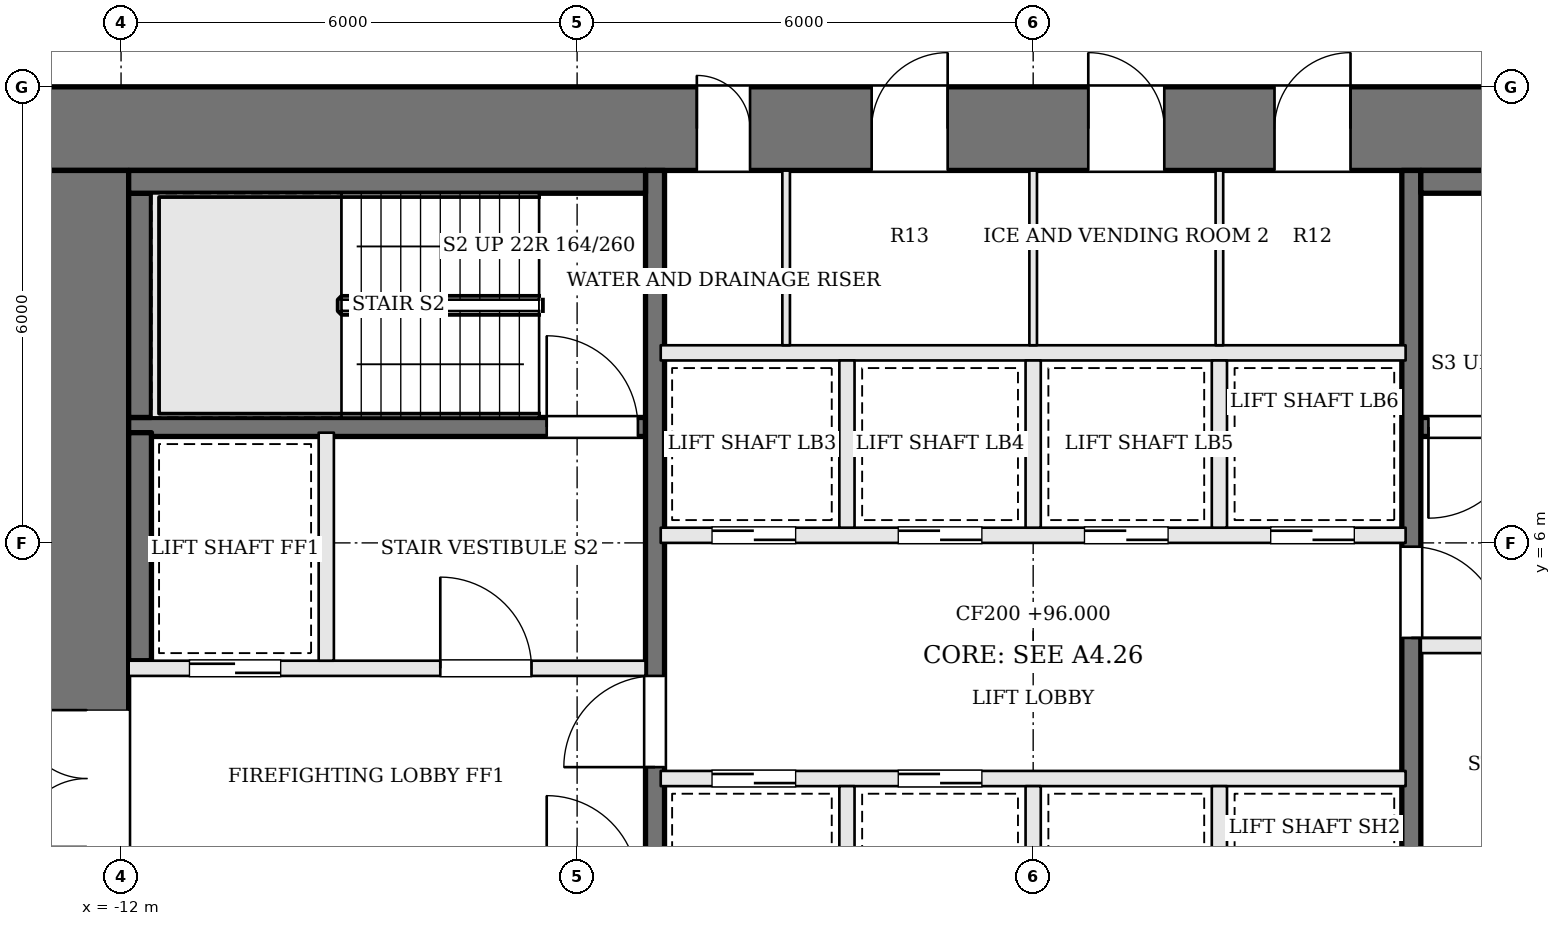
"""IFC4 building model, lengths in metres.
Left out: names, types, materials, properties, quantities, classifications, styles, units other than length and angle.
Written with IfcOpenShell. Run it as: python <this file> out.ifc"""

import sys

from ifc_helpers import new_model, si_unit, direction, frame, frame_2d, origin, place, context, subcontext, project, spatial, rectangle, extrude, element, fill, save


model = new_model("IFC4")
c1 = context("Model", 3, precision=1e-05, world=origin(), true_north=direction((0.0, 1.0)))
c2 = subcontext(c1, "Body", "Model", "MODEL_VIEW")
j1 = project(units=[si_unit("LENGTHUNIT", "METRE"), si_unit("PLANEANGLEUNIT", "RADIAN")], contexts=[c1])
p1 = place(None, origin())
s1 = spatial("IfcSite", under=j1, at=p1, CompositionType="ELEMENT")
p2 = place(p1, origin())
s2 = spatial("IfcBuilding", under=s1, at=p2, CompositionType="ELEMENT")
p3 = place(p2, frame((0.0, 0.0, 96.0)))
s3 = spatial("IfcBuildingStorey", under=s2, at=p3, CompositionType="ELEMENT", Elevation=96.0)
p4 = place(p3, frame((-13.0, 11.45, 0.0), z_axis=(0.0, 0.0, 1.0), x_axis=(1.0, 0.0, 0.0)))
e1 = element("IfcWall", 1, at=p4, inside=s3, PredefinedType="SHEAR", context=c2, shape_type="SweptSolid", body=[
    extrude(rectangle(XDim=26.0, YDim=1.1, at=frame_2d((13.0, 0.0))), origin(), (0.0, 0.0, 1.0), 3.6),
])
p5 = place(p4, frame((8.575, 0.0, 0.0)))
e2 = element("IfcOpeningElement", 2, at=p5, cuts=e1, PredefinedType="OPENING", context=c2, shape_type="SweptSolid", body=[
    extrude(rectangle(XDim=0.7, YDim=2.1, at=frame_2d((0.35, 1.05))), frame((0.0, 0.56, 0.0), z_axis=(0.0, -1.0, 0.0), x_axis=(1.0, 0.0, 0.0)), (0.0, 0.0, 1.0), 1.12),
])
p6 = place(p4, frame((10.875, 0.0, 0.0)))
e3 = element("IfcOpeningElement", 3, at=p6, cuts=e1, PredefinedType="OPENING", context=c2, shape_type="SweptSolid", body=[
    extrude(rectangle(XDim=1.0, YDim=2.1, at=frame_2d((0.5, 1.05))), frame((0.0, 0.56, 0.0), z_axis=(0.0, -1.0, 0.0), x_axis=(1.0, 0.0, 0.0)), (0.0, 0.0, 1.0), 1.12),
])
p7 = place(p4, frame((13.725, 0.0, 0.0)))
e4 = element("IfcOpeningElement", 4, at=p7, cuts=e1, PredefinedType="OPENING", context=c2, shape_type="SweptSolid", body=[
    extrude(rectangle(XDim=1.0, YDim=2.1, at=frame_2d((0.5, 1.05))), frame((0.0, 0.56, 0.0), z_axis=(0.0, -1.0, 0.0), x_axis=(1.0, 0.0, 0.0)), (0.0, 0.0, 1.0), 1.12),
])
p8 = place(p4, frame((16.175, 0.0, 0.0)))
e5 = element("IfcOpeningElement", 5, at=p8, cuts=e1, PredefinedType="OPENING", context=c2, shape_type="SweptSolid", body=[
    extrude(rectangle(XDim=1.0, YDim=2.1, at=frame_2d((0.5, 1.05))), frame((0.0, 0.56, 0.0), z_axis=(0.0, -1.0, 0.0), x_axis=(1.0, 0.0, 0.0)), (0.0, 0.0, 1.0), 1.12),
])
p9 = place(p3, frame((-12.45, -1.9, 0.0), z_axis=(0.0, 0.0, 1.0), x_axis=(0.0, 1.0, 0.0)))
e6 = element("IfcWall", 6, at=p9, inside=s3, PredefinedType="SHEAR", context=c2, shape_type="SweptSolid", body=[
    extrude(rectangle(XDim=12.8, YDim=1.1, at=frame_2d((6.4, 0.0))), origin(), (0.0, 0.0, 1.0), 3.6),
])
p10 = place(p9, frame((3.9, 0.0, 0.0)))
e7 = element("IfcOpeningElement", 7, at=p10, cuts=e6, PredefinedType="OPENING", context=c2, shape_type="SweptSolid", body=[
    extrude(rectangle(XDim=1.8, YDim=2.1, at=frame_2d((0.9, 1.05))), frame((0.0, 0.56, 0.0), z_axis=(0.0, -1.0, 0.0), x_axis=(1.0, 0.0, 0.0)), (0.0, 0.0, 1.0), 1.12),
])
p11 = place(p3, frame((11.9, 7.525, 0.0), z_axis=(0.0, 0.0, 1.0), x_axis=(-1.0, 0.0, 0.0)))
e8 = element("IfcWall", 8, at=p11, inside=s3, PredefinedType="SOLIDWALL", context=c2, shape_type="SweptSolid", body=[
    extrude(rectangle(XDim=6.8, YDim=0.25, at=frame_2d((3.4, 0.0))), origin(), (0.0, 0.0, 1.0), 3.4),
])
p12 = place(p11, frame((5.5, 0.0, 0.0)))
e9 = element("IfcOpeningElement", 9, at=p12, cuts=e8, PredefinedType="OPENING", context=c2, shape_type="SweptSolid", body=[
    extrude(rectangle(XDim=1.2, YDim=2.1, at=frame_2d((0.6, 1.05))), frame((0.0, 0.135, 0.0), z_axis=(0.0, -1.0, 0.0), x_axis=(1.0, 0.0, 0.0)), (0.0, 0.0, 1.0), 0.27),
])
p13 = place(p3, frame((-11.9, 4.35, 0.0), z_axis=(0.0, 0.0, 1.0), x_axis=(1.0, 0.0, 0.0)))
e10 = element("IfcWall", 10, at=p13, inside=s3, PredefinedType="SOLIDWALL", context=c2, shape_type="SweptSolid", body=[
    extrude(rectangle(XDim=6.8, YDim=0.2, at=frame_2d((3.4, 0.0))), origin(), (0.0, 0.0, 1.0), 3.4),
])
p14 = place(p13, frame((4.1, 0.0, 0.0)))
e11 = element("IfcOpeningElement", 11, at=p14, cuts=e10, PredefinedType="OPENING", context=c2, shape_type="SweptSolid", body=[
    extrude(rectangle(XDim=1.2, YDim=2.1, at=frame_2d((0.6, 1.05))), frame((0.0, 0.11, 0.0), z_axis=(0.0, -1.0, 0.0), x_axis=(1.0, 0.0, 0.0)), (0.0, 0.0, 1.0), 0.22),
])
p15 = place(p13, frame((0.8, 0.0, 0.0)))
e12 = element("IfcOpeningElement", 12, at=p15, cuts=e10, PredefinedType="OPENING", context=c2, shape_type="SweptSolid", body=[
    extrude(rectangle(XDim=1.2, YDim=2.1, at=frame_2d((0.6, 1.05))), frame((0.0, 0.11, 0.0), z_axis=(0.0, -1.0, 0.0), x_axis=(1.0, 0.0, 0.0)), (0.0, 0.0, 1.0), 0.22),
])
p16 = place(p3, frame((11.9, 4.65, 0.0), z_axis=(0.0, 0.0, 1.0), x_axis=(-1.0, 0.0, 0.0)))
e13 = element("IfcWall", 13, at=p16, inside=s3, PredefinedType="SOLIDWALL", context=c2, shape_type="SweptSolid", body=[
    extrude(rectangle(XDim=6.8, YDim=0.2, at=frame_2d((3.4, 0.0))), origin(), (0.0, 0.0, 1.0), 3.4),
])
p17 = place(p16, frame((4.1, 0.0, 0.0)))
e14 = element("IfcOpeningElement", 14, at=p17, cuts=e13, PredefinedType="OPENING", context=c2, shape_type="SweptSolid", body=[
    extrude(rectangle(XDim=1.2, YDim=2.1, at=frame_2d((0.6, 1.05))), frame((0.0, 0.11, 0.0), z_axis=(0.0, -1.0, 0.0), x_axis=(1.0, 0.0, 0.0)), (0.0, 0.0, 1.0), 0.22),
])
p18 = place(p16, frame((0.8, 0.0, 0.0)))
e15 = element("IfcOpeningElement", 15, at=p18, cuts=e13, PredefinedType="OPENING", context=c2, shape_type="SweptSolid", body=[
    extrude(rectangle(XDim=1.2, YDim=2.1, at=frame_2d((0.6, 1.05))), frame((0.0, 0.11, 0.0), z_axis=(0.0, -1.0, 0.0), x_axis=(1.0, 0.0, 0.0)), (0.0, 0.0, 1.0), 0.22),
])
p19 = place(p3, frame((-11.9, 7.525, 0.0), z_axis=(0.0, 0.0, 1.0), x_axis=(1.0, 0.0, 0.0)))
e16 = element("IfcWall", 16, at=p19, inside=s3, PredefinedType="SOLIDWALL", context=c2, shape_type="SweptSolid", body=[
    extrude(rectangle(XDim=6.8, YDim=0.25, at=frame_2d((3.4, 0.0))), origin(), (0.0, 0.0, 1.0), 3.4),
])
p20 = place(p19, frame((5.5, 0.0, 0.0)))
e17 = element("IfcOpeningElement", 17, at=p20, cuts=e16, PredefinedType="OPENING", context=c2, shape_type="SweptSolid", body=[
    extrude(rectangle(XDim=1.2, YDim=2.1, at=frame_2d((0.6, 1.05))), frame((0.0, 0.135, 0.0), z_axis=(0.0, -1.0, 0.0), x_axis=(1.0, 0.0, 0.0)), (0.0, 0.0, 1.0), 0.27),
])
p21 = place(p3, frame((-9.3, 4.45, 0.0), z_axis=(0.0, 0.0, 1.0), x_axis=(0.0, 1.0, 0.0)))
e18 = element("IfcWall", 18, at=p21, inside=s3, PredefinedType="SOLIDWALL", context=c2, shape_type="SweptSolid", body=[
    extrude(rectangle(XDim=3.0, YDim=0.2, at=frame_2d((1.5, 0.0))), origin(), (0.0, 0.0, 1.0), 3.4),
])
p22 = place(p3, frame((-4.975, -1.9, 0.0), z_axis=(0.0, 0.0, 1.0), x_axis=(0.0, 1.0, 0.0)))
e19 = element("IfcWall", 19, at=p22, inside=s3, PredefinedType="SOLIDWALL", context=c2, shape_type="SweptSolid", body=[
    extrude(rectangle(XDim=12.8, YDim=0.25, at=frame_2d((6.4, 0.0))), origin(), (0.0, 0.0, 1.0), 3.4),
])
p23 = place(p22, frame((4.95, 0.0, 0.0)))
e20 = element("IfcOpeningElement", 20, at=p23, cuts=e19, PredefinedType="OPENING", context=c2, shape_type="SweptSolid", body=[
    extrude(rectangle(XDim=1.2, YDim=2.1, at=frame_2d((0.6, 1.05))), frame((0.0, 0.135, 0.0), z_axis=(0.0, -1.0, 0.0), x_axis=(1.0, 0.0, 0.0)), (0.0, 0.0, 1.0), 0.27),
])
p24 = place(p3, frame((4.975, 10.9, 0.0), z_axis=(0.0, 0.0, 1.0), x_axis=(0.0, -1.0, 0.0)))
e21 = element("IfcWall", 21, at=p24, inside=s3, PredefinedType="SOLIDWALL", context=c2, shape_type="SweptSolid", body=[
    extrude(rectangle(XDim=12.8, YDim=0.25, at=frame_2d((6.4, 0.0))), origin(), (0.0, 0.0, 1.0), 3.4),
])
p25 = place(p24, frame((4.95, 0.0, 0.0)))
e22 = element("IfcOpeningElement", 22, at=p25, cuts=e21, PredefinedType="OPENING", context=c2, shape_type="SweptSolid", body=[
    extrude(rectangle(XDim=1.2, YDim=2.1, at=frame_2d((0.6, 1.05))), frame((0.0, 0.135, 0.0), z_axis=(0.0, -1.0, 0.0), x_axis=(1.0, 0.0, 0.0)), (0.0, 0.0, 1.0), 0.27),
])
p26 = place(p3, frame((-11.75, 4.45, 0.0), z_axis=(0.0, 0.0, 1.0), x_axis=(0.0, 1.0, 0.0)))
e23 = element("IfcWall", 23, at=p26, inside=s3, PredefinedType="SOLIDWALL", context=c2, shape_type="SweptSolid", body=[
    extrude(rectangle(XDim=3.0, YDim=0.3, at=frame_2d((1.5, 0.0))), origin(), (0.0, 0.0, 1.0), 3.4),
])
p27 = place(p3, frame((-11.75, 7.65, 0.0), z_axis=(0.0, 0.0, 1.0), x_axis=(0.0, 1.0, 0.0)))
e24 = element("IfcWall", 24, at=p27, inside=s3, PredefinedType="SOLIDWALL", context=c2, shape_type="SweptSolid", body=[
    extrude(rectangle(XDim=2.95, YDim=0.3, at=frame_2d((1.475, 0.0))), origin(), (0.0, 0.0, 1.0), 3.4),
])
for number, where, z_axis, x_axis in (
    (25, (-11.9, 10.75, 0.0), (0.0, 0.0, 1.0), (1.0, 0.0, 0.0)),
    (26, (11.9, 10.75, 0.0), (0.0, 0.0, 1.0), (-1.0, 0.0, 0.0)),
):
    element("IfcWall", number, at=place(p3, frame(where, z_axis=z_axis, x_axis=x_axis)), inside=s3, PredefinedType="SOLIDWALL", context=c2, shape_type="SweptSolid", body=[
        extrude(rectangle(XDim=6.8, YDim=0.3, at=frame_2d((3.4, 0.0))), origin(), (0.0, 0.0, 1.0), 3.4),
    ])
p28 = place(p3, frame((-4.9, 2.9, 0.0), z_axis=(0.0, 0.0, 1.0), x_axis=(1.0, 0.0, 0.0)))
e27 = element("IfcWall", 27, at=p28, inside=s3, PredefinedType="SOLIDWALL", context=c2, shape_type="SweptSolid", body=[
    extrude(rectangle(XDim=9.8, YDim=0.2, at=frame_2d((4.9, 0.0))), origin(), (0.0, 0.0, 1.0), 3.4),
])
p29 = place(p28, frame((0.675, 0.0, 0.0)))
e28 = element("IfcOpeningElement", 28, at=p29, cuts=e27, PredefinedType="OPENING", context=c2, shape_type="SweptSolid", body=[
    extrude(rectangle(XDim=1.1, YDim=2.1, at=frame_2d((0.55, 1.05))), frame((0.0, 0.11, 0.0), z_axis=(0.0, -1.0, 0.0), x_axis=(1.0, 0.0, 0.0)), (0.0, 0.0, 1.0), 0.22),
])
p30 = place(p28, frame((3.125, 0.0, 0.0)))
e29 = element("IfcOpeningElement", 29, at=p30, cuts=e27, PredefinedType="OPENING", context=c2, shape_type="SweptSolid", body=[
    extrude(rectangle(XDim=1.1, YDim=2.1, at=frame_2d((0.55, 1.05))), frame((0.0, 0.11, 0.0), z_axis=(0.0, -1.0, 0.0), x_axis=(1.0, 0.0, 0.0)), (0.0, 0.0, 1.0), 0.22),
])
p31 = place(p3, frame((-4.9, 6.1, 0.0), z_axis=(0.0, 0.0, 1.0), x_axis=(1.0, 0.0, 0.0)))
e30 = element("IfcWall", 30, at=p31, inside=s3, PredefinedType="SOLIDWALL", context=c2, shape_type="SweptSolid", body=[
    extrude(rectangle(XDim=9.8, YDim=0.2, at=frame_2d((4.9, 0.0))), origin(), (0.0, 0.0, 1.0), 3.4),
])
p32 = place(p31, frame((0.675, 0.0, 0.0)))
e31 = element("IfcOpeningElement", 31, at=p32, cuts=e30, PredefinedType="OPENING", context=c2, shape_type="SweptSolid", body=[
    extrude(rectangle(XDim=1.1, YDim=2.1, at=frame_2d((0.55, 1.05))), frame((0.0, 0.11, 0.0), z_axis=(0.0, -1.0, 0.0), x_axis=(1.0, 0.0, 0.0)), (0.0, 0.0, 1.0), 0.22),
])
p33 = place(p31, frame((3.125, 0.0, 0.0)))
e32 = element("IfcOpeningElement", 32, at=p33, cuts=e30, PredefinedType="OPENING", context=c2, shape_type="SweptSolid", body=[
    extrude(rectangle(XDim=1.1, YDim=2.1, at=frame_2d((0.55, 1.05))), frame((0.0, 0.11, 0.0), z_axis=(0.0, -1.0, 0.0), x_axis=(1.0, 0.0, 0.0)), (0.0, 0.0, 1.0), 0.22),
])
p34 = place(p31, frame((5.575, 0.0, 0.0)))
e33 = element("IfcOpeningElement", 33, at=p34, cuts=e30, PredefinedType="OPENING", context=c2, shape_type="SweptSolid", body=[
    extrude(rectangle(XDim=1.1, YDim=2.1, at=frame_2d((0.55, 1.05))), frame((0.0, 0.11, 0.0), z_axis=(0.0, -1.0, 0.0), x_axis=(1.0, 0.0, 0.0)), (0.0, 0.0, 1.0), 0.22),
])
p35 = place(p31, frame((8.025, 0.0, 0.0)))
e34 = element("IfcOpeningElement", 34, at=p35, cuts=e30, PredefinedType="OPENING", context=c2, shape_type="SweptSolid", body=[
    extrude(rectangle(XDim=1.1, YDim=2.1, at=frame_2d((0.55, 1.05))), frame((0.0, 0.11, 0.0), z_axis=(0.0, -1.0, 0.0), x_axis=(1.0, 0.0, 0.0)), (0.0, 0.0, 1.0), 0.22),
])
p36 = place(p3, frame((-4.9, 8.5, 0.0), z_axis=(0.0, 0.0, 1.0), x_axis=(1.0, 0.0, 0.0)))
e35 = element("IfcWall", 35, at=p36, inside=s3, PredefinedType="SOLIDWALL", context=c2, shape_type="SweptSolid", body=[
    extrude(rectangle(XDim=9.8, YDim=0.2, at=frame_2d((4.9, 0.0))), origin(), (0.0, 0.0, 1.0), 3.4),
])
for number, where, z_axis, x_axis in (
    (36, (-2.45, 0.6, 0.0), (0.0, 0.0, 1.0), (0.0, 1.0, 0.0)),
    (37, (0.0, 0.6, 0.0), (0.0, 0.0, 1.0), (0.0, 1.0, 0.0)),
    (38, (2.45, 0.6, 0.0), (0.0, 0.0, 1.0), (0.0, 1.0, 0.0)),
    (39, (-2.45, 6.2, 0.0), (0.0, 0.0, 1.0), (0.0, 1.0, 0.0)),
    (40, (0.0, 6.2, 0.0), (0.0, 0.0, 1.0), (0.0, 1.0, 0.0)),
    (41, (2.45, 6.2, 0.0), (0.0, 0.0, 1.0), (0.0, 1.0, 0.0)),
):
    element("IfcWall", number, at=place(p3, frame(where, z_axis=z_axis, x_axis=x_axis)), inside=s3, PredefinedType="SOLIDWALL", context=c2, shape_type="SweptSolid", body=[
        extrude(rectangle(XDim=2.2, YDim=0.2, at=frame_2d((1.1, 0.0))), origin(), (0.0, 0.0, 1.0), 3.4),
    ])
for number, where, z_axis, x_axis in (
    (42, (-3.25, 8.6, 0.0), (0.0, 0.0, 1.0), (0.0, 1.0, 0.0)),
    (43, (0.0, 8.6, 0.0), (0.0, 0.0, 1.0), (0.0, 1.0, 0.0)),
    (44, (2.45, 8.6, 0.0), (0.0, 0.0, 1.0), (0.0, 1.0, 0.0)),
):
    element("IfcWall", number, at=place(p3, frame(where, z_axis=z_axis, x_axis=x_axis)), inside=s3, PredefinedType="PARTITIONING", context=c2, shape_type="SweptSolid", body=[
        extrude(rectangle(XDim=2.3, YDim=0.1, at=frame_2d((1.15, 0.0))), origin(), (0.0, 0.0, 1.0), 3.4),
    ])
p37 = place(p10, origin())
e45 = element("IfcDoor", 45, at=p37, inside=s3, OperationType="DOUBLE_DOOR_SINGLE_SWING", PredefinedType="DOOR", context=c2, shape_type="SweptSolid", body=[
    extrude(rectangle(XDim=1.8, YDim=2.1, at=frame_2d((0.9, 1.05))), frame((0.0, 0.025, 0.0), z_axis=(0.0, -1.0, 0.0), x_axis=(1.0, 0.0, 0.0)), (0.0, 0.0, 1.0), 0.05),
])
fill(e7, e45)
p38 = place(p23, origin())
e46 = element("IfcDoor", 46, at=p38, inside=s3, OperationType="SINGLE_SWING_LEFT", PredefinedType="DOOR", context=c2, shape_type="SweptSolid", body=[
    extrude(rectangle(XDim=1.2, YDim=2.1, at=frame_2d((0.6, 1.05))), frame((0.0, 0.025, 0.0), z_axis=(0.0, -1.0, 0.0), x_axis=(1.0, 0.0, 0.0)), (0.0, 0.0, 1.0), 0.05),
])
fill(e20, e46)
p39 = place(p25, origin())
e47 = element("IfcDoor", 47, at=p39, inside=s3, OperationType="SINGLE_SWING_RIGHT", PredefinedType="DOOR", context=c2, shape_type="SweptSolid", body=[
    extrude(rectangle(XDim=1.2, YDim=2.1, at=frame_2d((0.6, 1.05))), frame((0.0, 0.025, 0.0), z_axis=(0.0, -1.0, 0.0), x_axis=(1.0, 0.0, 0.0)), (0.0, 0.0, 1.0), 0.05),
])
fill(e22, e47)
p40 = place(p14, origin())
e48 = element("IfcDoor", 48, at=p40, inside=s3, OperationType="SINGLE_SWING_LEFT", PredefinedType="DOOR", context=c2, shape_type="SweptSolid", body=[
    extrude(rectangle(XDim=1.2, YDim=2.1, at=frame_2d((0.6, 1.05))), frame((0.0, 0.025, 0.0), z_axis=(0.0, -1.0, 0.0), x_axis=(1.0, 0.0, 0.0)), (0.0, 0.0, 1.0), 0.05),
])
fill(e11, e48)
p41 = place(p12, origin())
e49 = element("IfcDoor", 49, at=p41, inside=s3, OperationType="SINGLE_SWING_RIGHT", PredefinedType="DOOR", context=c2, shape_type="SweptSolid", body=[
    extrude(rectangle(XDim=1.2, YDim=2.1, at=frame_2d((0.6, 1.05))), frame((0.0, 0.025, 0.0), z_axis=(0.0, -1.0, 0.0), x_axis=(1.0, 0.0, 0.0)), (0.0, 0.0, 1.0), 0.05),
])
fill(e9, e49)
p42 = place(p20, origin())
e50 = element("IfcDoor", 50, at=p42, inside=s3, OperationType="SINGLE_SWING_LEFT", PredefinedType="DOOR", context=c2, shape_type="SweptSolid", body=[
    extrude(rectangle(XDim=1.2, YDim=2.1, at=frame_2d((0.6, 1.05))), frame((0.0, 0.025, 0.0), z_axis=(0.0, -1.0, 0.0), x_axis=(1.0, 0.0, 0.0)), (0.0, 0.0, 1.0), 0.05),
])
fill(e17, e50)
p43 = place(p15, origin())
e51 = element("IfcDoor", 51, at=p43, inside=s3, OperationType="SLIDING_TO_RIGHT", PredefinedType="DOOR", context=c2, shape_type="SweptSolid", body=[
    extrude(rectangle(XDim=1.2, YDim=2.1, at=frame_2d((0.6, 1.05))), frame((0.0, 0.025, 0.0), z_axis=(0.0, -1.0, 0.0), x_axis=(1.0, 0.0, 0.0)), (0.0, 0.0, 1.0), 0.05),
])
fill(e12, e51)
p44 = place(p29, origin())
e52 = element("IfcDoor", 52, at=p44, inside=s3, OperationType="SLIDING_TO_RIGHT", PredefinedType="DOOR", context=c2, shape_type="SweptSolid", body=[
    extrude(rectangle(XDim=1.1, YDim=2.1, at=frame_2d((0.55, 1.05))), frame((0.0, 0.025, 0.0), z_axis=(0.0, -1.0, 0.0), x_axis=(1.0, 0.0, 0.0)), (0.0, 0.0, 1.0), 0.05),
])
fill(e28, e52)
p45 = place(p30, origin())
e53 = element("IfcDoor", 53, at=p45, inside=s3, OperationType="SLIDING_TO_LEFT", PredefinedType="DOOR", context=c2, shape_type="SweptSolid", body=[
    extrude(rectangle(XDim=1.1, YDim=2.1, at=frame_2d((0.55, 1.05))), frame((0.0, 0.025, 0.0), z_axis=(0.0, -1.0, 0.0), x_axis=(1.0, 0.0, 0.0)), (0.0, 0.0, 1.0), 0.05),
])
fill(e29, e53)
p46 = place(p32, origin())
e54 = element("IfcDoor", 54, at=p46, inside=s3, OperationType="SLIDING_TO_RIGHT", PredefinedType="DOOR", context=c2, shape_type="SweptSolid", body=[
    extrude(rectangle(XDim=1.1, YDim=2.1, at=frame_2d((0.55, 1.05))), frame((0.0, 0.025, 0.0), z_axis=(0.0, -1.0, 0.0), x_axis=(1.0, 0.0, 0.0)), (0.0, 0.0, 1.0), 0.05),
])
fill(e31, e54)
p47 = place(p33, origin())
e55 = element("IfcDoor", 55, at=p47, inside=s3, OperationType="SLIDING_TO_LEFT", PredefinedType="DOOR", context=c2, shape_type="SweptSolid", body=[
    extrude(rectangle(XDim=1.1, YDim=2.1, at=frame_2d((0.55, 1.05))), frame((0.0, 0.025, 0.0), z_axis=(0.0, -1.0, 0.0), x_axis=(1.0, 0.0, 0.0)), (0.0, 0.0, 1.0), 0.05),
])
fill(e32, e55)
p48 = place(p34, origin())
e56 = element("IfcDoor", 56, at=p48, inside=s3, OperationType="SLIDING_TO_RIGHT", PredefinedType="DOOR", context=c2, shape_type="SweptSolid", body=[
    extrude(rectangle(XDim=1.1, YDim=2.1, at=frame_2d((0.55, 1.05))), frame((0.0, 0.025, 0.0), z_axis=(0.0, -1.0, 0.0), x_axis=(1.0, 0.0, 0.0)), (0.0, 0.0, 1.0), 0.05),
])
fill(e33, e56)
p49 = place(p35, origin())
e57 = element("IfcDoor", 57, at=p49, inside=s3, OperationType="SLIDING_TO_LEFT", PredefinedType="DOOR", context=c2, shape_type="SweptSolid", body=[
    extrude(rectangle(XDim=1.1, YDim=2.1, at=frame_2d((0.55, 1.05))), frame((0.0, 0.025, 0.0), z_axis=(0.0, -1.0, 0.0), x_axis=(1.0, 0.0, 0.0)), (0.0, 0.0, 1.0), 0.05),
])
fill(e34, e57)
p50 = place(p5, origin())
e58 = element("IfcDoor", 58, at=p50, inside=s3, OperationType="SINGLE_SWING_LEFT", PredefinedType="DOOR", context=c2, shape_type="SweptSolid", body=[
    extrude(rectangle(XDim=0.7, YDim=2.1, at=frame_2d((0.35, 1.05))), frame((0.0, 0.025, 0.0), z_axis=(0.0, -1.0, 0.0), x_axis=(1.0, 0.0, 0.0)), (0.0, 0.0, 1.0), 0.05),
])
fill(e2, e58)
p51 = place(p6, origin())
e59 = element("IfcDoor", 59, at=p51, inside=s3, OperationType="SINGLE_SWING_RIGHT", PredefinedType="DOOR", context=c2, shape_type="SweptSolid", body=[
    extrude(rectangle(XDim=1.0, YDim=2.1, at=frame_2d((0.5, 1.05))), frame((0.0, 0.025, 0.0), z_axis=(0.0, -1.0, 0.0), x_axis=(1.0, 0.0, 0.0)), (0.0, 0.0, 1.0), 0.05),
])
fill(e3, e59)
p52 = place(p7, origin())
e60 = element("IfcDoor", 60, at=p52, inside=s3, OperationType="SINGLE_SWING_LEFT", PredefinedType="DOOR", context=c2, shape_type="SweptSolid", body=[
    extrude(rectangle(XDim=1.0, YDim=2.1, at=frame_2d((0.5, 1.05))), frame((0.0, 0.025, 0.0), z_axis=(0.0, -1.0, 0.0), x_axis=(1.0, 0.0, 0.0)), (0.0, 0.0, 1.0), 0.05),
])
fill(e4, e60)
p53 = place(p8, origin())
e61 = element("IfcDoor", 61, at=p53, inside=s3, OperationType="SINGLE_SWING_RIGHT", PredefinedType="DOOR", context=c2, shape_type="SweptSolid", body=[
    extrude(rectangle(XDim=1.0, YDim=2.1, at=frame_2d((0.5, 1.05))), frame((0.0, 0.025, 0.0), z_axis=(0.0, -1.0, 0.0), x_axis=(1.0, 0.0, 0.0)), (0.0, 0.0, 1.0), 0.05),
])
fill(e5, e61)
save(model, sys.argv[1])
